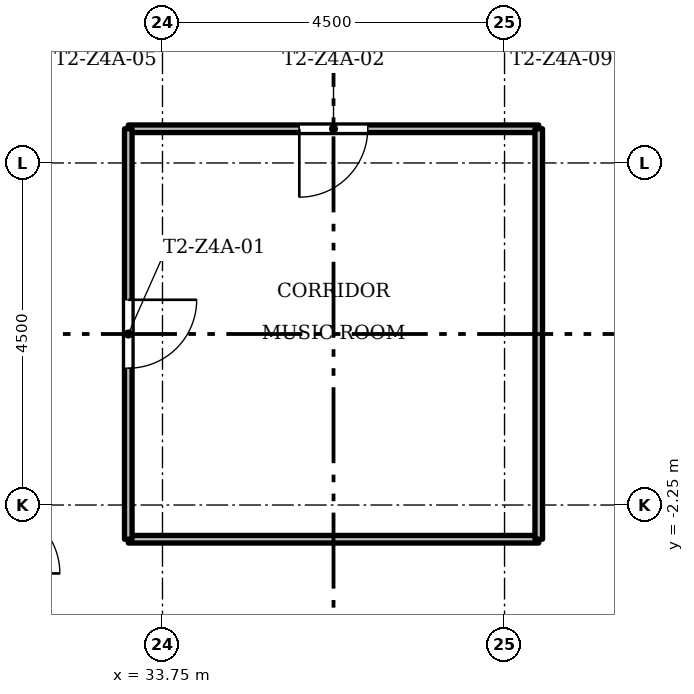
"""IFC4 building model, lengths in metres.
Left out: names, types, materials, properties, quantities, classifications, styles, units other than length and angle.
Written with IfcOpenShell. Run it as: python <this file> out.ifc"""

import sys

from ifc_helpers import new_model, si_unit, direction, frame, frame_2d, origin, place, context, subcontext, project, spatial, rectangle, extrude, element, fill, save


model = new_model("IFC4")
c1 = context("Model", 3, precision=1e-05, world=origin(), true_north=direction((0.0, 1.0)))
c2 = subcontext(c1, "Body", "Model", "MODEL_VIEW")
j1 = project(units=[si_unit("LENGTHUNIT", "METRE"), si_unit("PLANEANGLEUNIT", "RADIAN")], contexts=[c1])
p1 = place(None, origin())
s1 = spatial("IfcSite", under=j1, at=p1, CompositionType="ELEMENT")
p2 = place(p1, origin())
s2 = spatial("IfcBuilding", under=s1, at=p2, CompositionType="ELEMENT")
p3 = place(p2, frame((0.0, 0.0, 226.6)))
s3 = spatial("IfcBuildingStorey", under=s2, at=p3, CompositionType="ELEMENT", Elevation=226.6)
p4 = place(p3, frame((38.7, -2.7, 0.0), z_axis=(0.0, 0.0, 1.0), x_axis=(-1.0, 0.0, 0.0)))
e1 = element("IfcWall", 1, at=p4, inside=s3, PredefinedType="PARTITIONING", context=c2, shape_type="SweptSolid", body=[
    extrude(rectangle(XDim=5.4, YDim=0.1, at=frame_2d((2.7, 0.0))), origin(), (0.0, 0.0, 1.0), 3.0),
])
p5 = place(p3, frame((38.7, 2.7, 0.0), z_axis=(0.0, 0.0, 1.0), x_axis=(-1.0, 0.0, 0.0)))
e2 = element("IfcWall", 2, at=p5, inside=s3, PredefinedType="PARTITIONING", context=c2, shape_type="SweptSolid", body=[
    extrude(rectangle(XDim=5.4, YDim=0.1, at=frame_2d((2.7, 0.0))), origin(), (0.0, 0.0, 1.0), 3.0),
])
p6 = place(p5, frame((2.25, 0.0, 0.0)))
e3 = element("IfcOpeningElement", 3, at=p6, cuts=e2, PredefinedType="OPENING", context=c2, shape_type="SweptSolid", body=[
    extrude(rectangle(XDim=0.9, YDim=2.1, at=frame_2d((0.45, 1.05))), frame((0.0, 0.06, 0.0), z_axis=(0.0, -1.0, 0.0), x_axis=(1.0, 0.0, 0.0)), (0.0, 0.0, 1.0), 0.12),
])
p7 = place(p3, frame((38.7, -2.7, 0.0), z_axis=(0.0, 0.0, 1.0), x_axis=(0.0, 1.0, 0.0)))
e4 = element("IfcWall", 4, at=p7, inside=s3, PredefinedType="PARTITIONING", context=c2, shape_type="SweptSolid", body=[
    extrude(rectangle(XDim=5.4, YDim=0.1, at=frame_2d((2.7, 0.0))), origin(), (0.0, 0.0, 1.0), 3.0),
])
p8 = place(p3, frame((33.3, -2.7, 0.0), z_axis=(0.0, 0.0, 1.0), x_axis=(0.0, 1.0, 0.0)))
e5 = element("IfcWall", 5, at=p8, inside=s3, PredefinedType="PARTITIONING", context=c2, shape_type="SweptSolid", body=[
    extrude(rectangle(XDim=5.4, YDim=0.1, at=frame_2d((2.7, 0.0))), origin(), (0.0, 0.0, 1.0), 3.0),
])
p9 = place(p8, frame((2.25, 0.0, 0.0)))
e6 = element("IfcOpeningElement", 6, at=p9, cuts=e5, PredefinedType="OPENING", context=c2, shape_type="SweptSolid", body=[
    extrude(rectangle(XDim=0.9, YDim=2.1, at=frame_2d((0.45, 1.05))), frame((0.0, 0.06, 0.0), z_axis=(0.0, -1.0, 0.0), x_axis=(1.0, 0.0, 0.0)), (0.0, 0.0, 1.0), 0.12),
])
p10 = place(p9, origin())
e7 = element("IfcDoor", 7, at=p10, inside=s3, OperationType="SINGLE_SWING_RIGHT", PredefinedType="DOOR", context=c2, shape_type="SweptSolid", body=[
    extrude(rectangle(XDim=0.9, YDim=2.1, at=frame_2d((0.45, 1.05))), frame((0.0, 0.025, 0.0), z_axis=(0.0, -1.0, 0.0), x_axis=(1.0, 0.0, 0.0)), (0.0, 0.0, 1.0), 0.05),
])
fill(e6, e7)
p11 = place(p6, origin())
e8 = element("IfcDoor", 8, at=p11, inside=s3, OperationType="SINGLE_SWING_LEFT", PredefinedType="DOOR", context=c2, shape_type="SweptSolid", body=[
    extrude(rectangle(XDim=0.9, YDim=2.1, at=frame_2d((0.45, 1.05))), frame((0.0, 0.025, 0.0), z_axis=(0.0, -1.0, 0.0), x_axis=(1.0, 0.0, 0.0)), (0.0, 0.0, 1.0), 0.05),
])
fill(e3, e8)
save(model, sys.argv[1])
